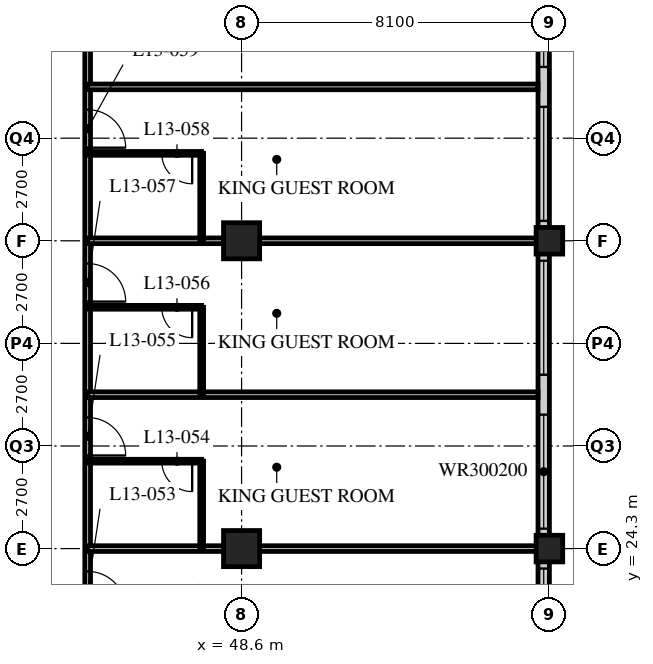
"""IFC4 building model, lengths in metres.
Left out: names, types, materials, properties, quantities, classifications, styles, units other than length and angle.
Written with IfcOpenShell. Run it as: python <this file> out.ifc"""

import sys

from ifc_helpers import new_model, si_unit, direction, frame, frame_2d, origin, origin_2d, place, context, subcontext, project, spatial, rectangle, hollow_rectangle, extrude, element, fill, save


model = new_model("IFC4")
c1 = context("Model", 3, precision=1e-05, world=origin(), true_north=direction((0.0, 1.0)))
c2 = subcontext(c1, "Body", "Model", "MODEL_VIEW")
j1 = project(units=[si_unit("LENGTHUNIT", "METRE"), si_unit("PLANEANGLEUNIT", "RADIAN")], contexts=[c1])
p1 = place(None, origin())
s1 = spatial("IfcSite", under=j1, at=p1, CompositionType="ELEMENT")
p2 = place(p1, origin())
s2 = spatial("IfcBuilding", under=s1, at=p2, CompositionType="ELEMENT")
p3 = place(p2, frame((0.0, 0.0, 56.8)))
s3 = spatial("IfcBuildingStorey", under=s2, at=p3, CompositionType="ELEMENT", Elevation=56.8)
for number, where, z_axis, x_axis in (
    (1, (48.6, 24.3, 0.0), (0.0, 0.0, 1.0), (1.0, 0.0, 0.0)),
    (2, (48.6, 32.4, 0.0), (0.0, 0.0, 1.0), (1.0, 0.0, 0.0)),
):
    element("IfcColumn", number, at=place(p3, frame(where, z_axis=z_axis, x_axis=x_axis)), inside=s3, PredefinedType="COLUMN", context=c2, shape_type="SweptSolid", body=[
        extrude(hollow_rectangle(XDim=0.95, YDim=0.95, WallThickness=0.095, at=origin_2d()), origin(), (0.0, 0.0, 1.0), 3.4),
    ])
for number, where, z_axis, x_axis in (
    (3, (56.7, 24.3, 0.0), (0.0, 0.0, 1.0), (1.0, 0.0, 0.0)),
    (4, (56.7, 32.4, 0.0), (0.0, 0.0, 1.0), (1.0, 0.0, 0.0)),
):
    element("IfcColumn", number, at=place(p3, frame(where, z_axis=z_axis, x_axis=x_axis)), inside=s3, PredefinedType="COLUMN", context=c2, shape_type="SweptSolid", body=[
        extrude(hollow_rectangle(XDim=0.7, YDim=0.7, WallThickness=0.06, at=origin_2d()), origin(), (0.0, 0.0, 1.0), 3.4),
    ])
p4 = place(p3, frame((56.55, 8.4, 0.0), z_axis=(0.0, 0.0, 1.0), x_axis=(0.0, 1.0, 0.0)))
e5 = element("IfcWall", 5, at=p4, inside=s3, PredefinedType="SOLIDWALL", context=c2, shape_type="SweptSolid", body=[
    extrude(rectangle(XDim=32.1, YDim=0.3, at=frame_2d((16.05, 0.0))), origin(), (0.0, 0.0, 1.0), 3.19),
])
p5 = place(p4, frame((0.225, 0.0, 0.9)))
e6 = element("IfcOpeningElement", 6, at=p5, cuts=e5, PredefinedType="OPENING", context=c2, shape_type="SweptSolid", body=[
    extrude(rectangle(XDim=3.0, YDim=2.0, at=frame_2d((1.5, 1.0))), frame((0.0, 0.16, 0.0), z_axis=(0.0, -1.0, 0.0), x_axis=(1.0, 0.0, 0.0)), (0.0, 0.0, 1.0), 0.32),
])
p6 = place(p4, frame((4.275, 0.0, 0.9)))
e7 = element("IfcOpeningElement", 7, at=p6, cuts=e5, PredefinedType="OPENING", context=c2, shape_type="SweptSolid", body=[
    extrude(rectangle(XDim=3.0, YDim=2.0, at=frame_2d((1.5, 1.0))), frame((0.0, 0.16, 0.0), z_axis=(0.0, -1.0, 0.0), x_axis=(1.0, 0.0, 0.0)), (0.0, 0.0, 1.0), 0.32),
])
p7 = place(p4, frame((8.325, 0.0, 0.9)))
e8 = element("IfcOpeningElement", 8, at=p7, cuts=e5, PredefinedType="OPENING", context=c2, shape_type="SweptSolid", body=[
    extrude(rectangle(XDim=3.0, YDim=2.0, at=frame_2d((1.5, 1.0))), frame((0.0, 0.16, 0.0), z_axis=(0.0, -1.0, 0.0), x_axis=(1.0, 0.0, 0.0)), (0.0, 0.0, 1.0), 0.32),
])
p8 = place(p4, frame((12.375, 0.0, 0.9)))
e9 = element("IfcOpeningElement", 9, at=p8, cuts=e5, PredefinedType="OPENING", context=c2, shape_type="SweptSolid", body=[
    extrude(rectangle(XDim=3.0, YDim=2.0, at=frame_2d((1.5, 1.0))), frame((0.0, 0.16, 0.0), z_axis=(0.0, -1.0, 0.0), x_axis=(1.0, 0.0, 0.0)), (0.0, 0.0, 1.0), 0.32),
])
p9 = place(p4, frame((16.425, 0.0, 0.9)))
e10 = element("IfcOpeningElement", 10, at=p9, cuts=e5, PredefinedType="OPENING", context=c2, shape_type="SweptSolid", body=[
    extrude(rectangle(XDim=3.0, YDim=2.0, at=frame_2d((1.5, 1.0))), frame((0.0, 0.16, 0.0), z_axis=(0.0, -1.0, 0.0), x_axis=(1.0, 0.0, 0.0)), (0.0, 0.0, 1.0), 0.32),
])
p10 = place(p4, frame((20.475, 0.0, 0.9)))
e11 = element("IfcOpeningElement", 11, at=p10, cuts=e5, PredefinedType="OPENING", context=c2, shape_type="SweptSolid", body=[
    extrude(rectangle(XDim=3.0, YDim=2.0, at=frame_2d((1.5, 1.0))), frame((0.0, 0.16, 0.0), z_axis=(0.0, -1.0, 0.0), x_axis=(1.0, 0.0, 0.0)), (0.0, 0.0, 1.0), 0.32),
])
p11 = place(p4, frame((24.525, 0.0, 0.9)))
e12 = element("IfcOpeningElement", 12, at=p11, cuts=e5, PredefinedType="OPENING", context=c2, shape_type="SweptSolid", body=[
    extrude(rectangle(XDim=3.0, YDim=2.0, at=frame_2d((1.5, 1.0))), frame((0.0, 0.16, 0.0), z_axis=(0.0, -1.0, 0.0), x_axis=(1.0, 0.0, 0.0)), (0.0, 0.0, 1.0), 0.32),
])
p12 = place(p4, frame((28.575, 0.0, 0.9)))
e13 = element("IfcOpeningElement", 13, at=p12, cuts=e5, PredefinedType="OPENING", context=c2, shape_type="SweptSolid", body=[
    extrude(rectangle(XDim=3.0, YDim=2.0, at=frame_2d((1.5, 1.0))), frame((0.0, 0.16, 0.0), z_axis=(0.0, -1.0, 0.0), x_axis=(1.0, 0.0, 0.0)), (0.0, 0.0, 1.0), 0.32),
])
p13 = place(p3, frame((44.55, 12.15, 0.0), z_axis=(0.0, 0.0, 1.0), x_axis=(0.0, 1.0, 0.0)))
e14 = element("IfcWall", 14, at=p13, inside=s3, PredefinedType="PARTITIONING", context=c2, shape_type="SweptSolid", body=[
    extrude(rectangle(XDim=30.15, YDim=0.15, at=frame_2d((15.075, 0.0))), origin(), (0.0, 0.0, 1.0), 3.19),
])
p14 = place(p13, frame((2.75, 0.0, 0.0)))
e15 = element("IfcOpeningElement", 15, at=p14, cuts=e14, PredefinedType="OPENING", context=c2, shape_type="SweptSolid", body=[
    extrude(rectangle(XDim=1.0, YDim=2.1, at=frame_2d((0.5, 1.05))), frame((0.0, 0.085, 0.0), z_axis=(0.0, -1.0, 0.0), x_axis=(1.0, 0.0, 0.0)), (0.0, 0.0, 1.0), 0.17),
])
p15 = place(p13, frame((6.5, 0.0, 0.0)))
e16 = element("IfcOpeningElement", 16, at=p15, cuts=e14, PredefinedType="OPENING", context=c2, shape_type="SweptSolid", body=[
    extrude(rectangle(XDim=1.0, YDim=2.1, at=frame_2d((0.5, 1.05))), frame((0.0, 0.085, 0.0), z_axis=(0.0, -1.0, 0.0), x_axis=(1.0, 0.0, 0.0)), (0.0, 0.0, 1.0), 0.17),
])
p16 = place(p13, frame((10.55, 0.0, 0.0)))
e17 = element("IfcOpeningElement", 17, at=p16, cuts=e14, PredefinedType="OPENING", context=c2, shape_type="SweptSolid", body=[
    extrude(rectangle(XDim=1.0, YDim=2.1, at=frame_2d((0.5, 1.05))), frame((0.0, 0.085, 0.0), z_axis=(0.0, -1.0, 0.0), x_axis=(1.0, 0.0, 0.0)), (0.0, 0.0, 1.0), 0.17),
])
p17 = place(p13, frame((14.6, 0.0, 0.0)))
e18 = element("IfcOpeningElement", 18, at=p17, cuts=e14, PredefinedType="OPENING", context=c2, shape_type="SweptSolid", body=[
    extrude(rectangle(XDim=1.0, YDim=2.1, at=frame_2d((0.5, 1.05))), frame((0.0, 0.085, 0.0), z_axis=(0.0, -1.0, 0.0), x_axis=(1.0, 0.0, 0.0)), (0.0, 0.0, 1.0), 0.17),
])
p18 = place(p13, frame((18.65, 0.0, 0.0)))
e19 = element("IfcOpeningElement", 19, at=p18, cuts=e14, PredefinedType="OPENING", context=c2, shape_type="SweptSolid", body=[
    extrude(rectangle(XDim=1.0, YDim=2.1, at=frame_2d((0.5, 1.05))), frame((0.0, 0.085, 0.0), z_axis=(0.0, -1.0, 0.0), x_axis=(1.0, 0.0, 0.0)), (0.0, 0.0, 1.0), 0.17),
])
p19 = place(p13, frame((22.7, 0.0, 0.0)))
e20 = element("IfcOpeningElement", 20, at=p19, cuts=e14, PredefinedType="OPENING", context=c2, shape_type="SweptSolid", body=[
    extrude(rectangle(XDim=1.0, YDim=2.1, at=frame_2d((0.5, 1.05))), frame((0.0, 0.085, 0.0), z_axis=(0.0, -1.0, 0.0), x_axis=(1.0, 0.0, 0.0)), (0.0, 0.0, 1.0), 0.17),
])
p20 = place(p13, frame((26.7, 0.0, 0.0)))
e21 = element("IfcOpeningElement", 21, at=p20, cuts=e14, PredefinedType="OPENING", context=c2, shape_type="SweptSolid", body=[
    extrude(rectangle(XDim=1.0, YDim=2.1, at=frame_2d((0.5, 1.05))), frame((0.0, 0.085, 0.0), z_axis=(0.0, -1.0, 0.0), x_axis=(1.0, 0.0, 0.0)), (0.0, 0.0, 1.0), 0.17),
])
p21 = place(p3, frame((44.55, 24.3, 0.0), z_axis=(0.0, 0.0, 1.0), x_axis=(1.0, 0.0, 0.0)))
e22 = element("IfcWall", 22, at=p21, inside=s3, PredefinedType="PARTITIONING", context=c2, shape_type="SweptSolid", body=[
    extrude(rectangle(XDim=11.85, YDim=0.15, at=frame_2d((5.925, 0.0))), origin(), (0.0, 0.0, 1.0), 2.578),
])
p22 = place(p3, frame((47.55, 24.3, 0.0), z_axis=(0.0, 0.0, 1.0), x_axis=(0.0, 1.0, 0.0)))
e23 = element("IfcWall", 23, at=p22, inside=s3, PredefinedType="PARTITIONING", context=c2, shape_type="SweptSolid", body=[
    extrude(rectangle(XDim=2.3, YDim=0.1, at=frame_2d((1.15, 0.0))), origin(), (0.0, 0.0, 1.0), 3.19),
])
p23 = place(p3, frame((44.55, 26.6, 0.0), z_axis=(0.0, 0.0, 1.0), x_axis=(1.0, 0.0, 0.0)))
e24 = element("IfcWall", 24, at=p23, inside=s3, PredefinedType="PARTITIONING", context=c2, shape_type="SweptSolid", body=[
    extrude(rectangle(XDim=3.0, YDim=0.1, at=frame_2d((1.5, 0.0))), origin(), (0.0, 0.0, 1.0), 3.19),
])
p24 = place(p23, frame((1.95, 0.0, 0.0)))
e25 = element("IfcOpeningElement", 25, at=p24, cuts=e24, PredefinedType="OPENING", context=c2, shape_type="SweptSolid", body=[
    extrude(rectangle(XDim=0.8, YDim=2.1, at=frame_2d((0.4, 1.05))), frame((0.0, 0.06, 0.0), z_axis=(0.0, -1.0, 0.0), x_axis=(1.0, 0.0, 0.0)), (0.0, 0.0, 1.0), 0.12),
])
p25 = place(p3, frame((44.55, 28.35, 0.0), z_axis=(0.0, 0.0, 1.0), x_axis=(1.0, 0.0, 0.0)))
e26 = element("IfcWall", 26, at=p25, inside=s3, PredefinedType="PARTITIONING", context=c2, shape_type="SweptSolid", body=[
    extrude(rectangle(XDim=11.85, YDim=0.15, at=frame_2d((5.925, 0.0))), origin(), (0.0, 0.0, 1.0), 3.19),
])
p26 = place(p3, frame((47.55, 28.35, 0.0), z_axis=(0.0, 0.0, 1.0), x_axis=(0.0, 1.0, 0.0)))
e27 = element("IfcWall", 27, at=p26, inside=s3, PredefinedType="PARTITIONING", context=c2, shape_type="SweptSolid", body=[
    extrude(rectangle(XDim=2.3, YDim=0.1, at=frame_2d((1.15, 0.0))), origin(), (0.0, 0.0, 1.0), 3.19),
])
p27 = place(p3, frame((44.55, 30.65, 0.0), z_axis=(0.0, 0.0, 1.0), x_axis=(1.0, 0.0, 0.0)))
e28 = element("IfcWall", 28, at=p27, inside=s3, PredefinedType="PARTITIONING", context=c2, shape_type="SweptSolid", body=[
    extrude(rectangle(XDim=3.0, YDim=0.1, at=frame_2d((1.5, 0.0))), origin(), (0.0, 0.0, 1.0), 3.19),
])
p28 = place(p27, frame((1.95, 0.0, 0.0)))
e29 = element("IfcOpeningElement", 29, at=p28, cuts=e28, PredefinedType="OPENING", context=c2, shape_type="SweptSolid", body=[
    extrude(rectangle(XDim=0.8, YDim=2.1, at=frame_2d((0.4, 1.05))), frame((0.0, 0.06, 0.0), z_axis=(0.0, -1.0, 0.0), x_axis=(1.0, 0.0, 0.0)), (0.0, 0.0, 1.0), 0.12),
])
p29 = place(p3, frame((44.55, 32.4, 0.0), z_axis=(0.0, 0.0, 1.0), x_axis=(1.0, 0.0, 0.0)))
e30 = element("IfcWall", 30, at=p29, inside=s3, PredefinedType="PARTITIONING", context=c2, shape_type="SweptSolid", body=[
    extrude(rectangle(XDim=11.85, YDim=0.15, at=frame_2d((5.925, 0.0))), origin(), (0.0, 0.0, 1.0), 2.578),
])
p30 = place(p3, frame((47.55, 32.4, 0.0), z_axis=(0.0, 0.0, 1.0), x_axis=(0.0, 1.0, 0.0)))
e31 = element("IfcWall", 31, at=p30, inside=s3, PredefinedType="PARTITIONING", context=c2, shape_type="SweptSolid", body=[
    extrude(rectangle(XDim=2.3, YDim=0.1, at=frame_2d((1.15, 0.0))), origin(), (0.0, 0.0, 1.0), 3.19),
])
p31 = place(p3, frame((44.55, 34.7, 0.0), z_axis=(0.0, 0.0, 1.0), x_axis=(1.0, 0.0, 0.0)))
e32 = element("IfcWall", 32, at=p31, inside=s3, PredefinedType="PARTITIONING", context=c2, shape_type="SweptSolid", body=[
    extrude(rectangle(XDim=3.0, YDim=0.1, at=frame_2d((1.5, 0.0))), origin(), (0.0, 0.0, 1.0), 3.19),
])
p32 = place(p31, frame((1.95, 0.0, 0.0)))
e33 = element("IfcOpeningElement", 33, at=p32, cuts=e32, PredefinedType="OPENING", context=c2, shape_type="SweptSolid", body=[
    extrude(rectangle(XDim=0.8, YDim=2.1, at=frame_2d((0.4, 1.05))), frame((0.0, 0.06, 0.0), z_axis=(0.0, -1.0, 0.0), x_axis=(1.0, 0.0, 0.0)), (0.0, 0.0, 1.0), 0.12),
])
p33 = place(p3, frame((44.55, 36.45, 0.0), z_axis=(0.0, 0.0, 1.0), x_axis=(1.0, 0.0, 0.0)))
e34 = element("IfcWall", 34, at=p33, inside=s3, PredefinedType="PARTITIONING", context=c2, shape_type="SweptSolid", body=[
    extrude(rectangle(XDim=11.85, YDim=0.15, at=frame_2d((5.925, 0.0))), origin(), (0.0, 0.0, 1.0), 3.19),
])
p34 = place(p8, origin())
e35 = element("IfcWindow", 35, at=p34, inside=s3, PartitioningType="SINGLE_PANEL", PredefinedType="WINDOW", context=c2, shape_type="SweptSolid", body=[
    extrude(rectangle(XDim=3.0, YDim=2.0, at=frame_2d((1.5, 1.0))), frame((0.0, 0.03, 0.0), z_axis=(0.0, -1.0, 0.0), x_axis=(1.0, 0.0, 0.0)), (0.0, 0.0, 1.0), 0.06),
])
fill(e9, e35)
p35 = place(p9, origin())
e36 = element("IfcWindow", 36, at=p35, inside=s3, PartitioningType="SINGLE_PANEL", PredefinedType="WINDOW", context=c2, shape_type="SweptSolid", body=[
    extrude(rectangle(XDim=3.0, YDim=2.0, at=frame_2d((1.5, 1.0))), frame((0.0, 0.03, 0.0), z_axis=(0.0, -1.0, 0.0), x_axis=(1.0, 0.0, 0.0)), (0.0, 0.0, 1.0), 0.06),
])
fill(e10, e36)
p36 = place(p10, origin())
e37 = element("IfcWindow", 37, at=p36, inside=s3, PartitioningType="SINGLE_PANEL", PredefinedType="WINDOW", context=c2, shape_type="SweptSolid", body=[
    extrude(rectangle(XDim=3.0, YDim=2.0, at=frame_2d((1.5, 1.0))), frame((0.0, 0.03, 0.0), z_axis=(0.0, -1.0, 0.0), x_axis=(1.0, 0.0, 0.0)), (0.0, 0.0, 1.0), 0.06),
])
fill(e11, e37)
p37 = place(p11, origin())
e38 = element("IfcWindow", 38, at=p37, inside=s3, PartitioningType="SINGLE_PANEL", PredefinedType="WINDOW", context=c2, shape_type="SweptSolid", body=[
    extrude(rectangle(XDim=3.0, YDim=2.0, at=frame_2d((1.5, 1.0))), frame((0.0, 0.03, 0.0), z_axis=(0.0, -1.0, 0.0), x_axis=(1.0, 0.0, 0.0)), (0.0, 0.0, 1.0), 0.06),
])
fill(e12, e38)
p38 = place(p12, origin())
e39 = element("IfcWindow", 39, at=p38, inside=s3, PartitioningType="SINGLE_PANEL", PredefinedType="WINDOW", context=c2, shape_type="SweptSolid", body=[
    extrude(rectangle(XDim=3.0, YDim=2.0, at=frame_2d((1.5, 1.0))), frame((0.0, 0.03, 0.0), z_axis=(0.0, -1.0, 0.0), x_axis=(1.0, 0.0, 0.0)), (0.0, 0.0, 1.0), 0.06),
])
fill(e13, e39)
p39 = place(p16, origin())
e40 = element("IfcDoor", 40, at=p39, inside=s3, OperationType="SINGLE_SWING_RIGHT", PredefinedType="DOOR", context=c2, shape_type="SweptSolid", body=[
    extrude(rectangle(XDim=1.0, YDim=2.1, at=frame_2d((0.5, 1.05))), frame((0.0, 0.025, 0.0), z_axis=(0.0, -1.0, 0.0), x_axis=(1.0, 0.0, 0.0)), (0.0, 0.0, 1.0), 0.05),
])
fill(e17, e40)
p40 = place(p24, origin())
e41 = element("IfcDoor", 41, at=p40, inside=s3, OperationType="SINGLE_SWING_LEFT", PredefinedType="DOOR", context=c2, shape_type="SweptSolid", body=[
    extrude(rectangle(XDim=0.8, YDim=2.1, at=frame_2d((0.4, 1.05))), frame((0.0, 0.025, 0.0), z_axis=(0.0, -1.0, 0.0), x_axis=(1.0, 0.0, 0.0)), (0.0, 0.0, 1.0), 0.05),
])
fill(e25, e41)
p41 = place(p17, origin())
e42 = element("IfcDoor", 42, at=p41, inside=s3, OperationType="SINGLE_SWING_RIGHT", PredefinedType="DOOR", context=c2, shape_type="SweptSolid", body=[
    extrude(rectangle(XDim=1.0, YDim=2.1, at=frame_2d((0.5, 1.05))), frame((0.0, 0.025, 0.0), z_axis=(0.0, -1.0, 0.0), x_axis=(1.0, 0.0, 0.0)), (0.0, 0.0, 1.0), 0.05),
])
fill(e18, e42)
p42 = place(p28, origin())
e43 = element("IfcDoor", 43, at=p42, inside=s3, OperationType="SINGLE_SWING_LEFT", PredefinedType="DOOR", context=c2, shape_type="SweptSolid", body=[
    extrude(rectangle(XDim=0.8, YDim=2.1, at=frame_2d((0.4, 1.05))), frame((0.0, 0.025, 0.0), z_axis=(0.0, -1.0, 0.0), x_axis=(1.0, 0.0, 0.0)), (0.0, 0.0, 1.0), 0.05),
])
fill(e29, e43)
p43 = place(p18, origin())
e44 = element("IfcDoor", 44, at=p43, inside=s3, OperationType="SINGLE_SWING_RIGHT", PredefinedType="DOOR", context=c2, shape_type="SweptSolid", body=[
    extrude(rectangle(XDim=1.0, YDim=2.1, at=frame_2d((0.5, 1.05))), frame((0.0, 0.025, 0.0), z_axis=(0.0, -1.0, 0.0), x_axis=(1.0, 0.0, 0.0)), (0.0, 0.0, 1.0), 0.05),
])
fill(e19, e44)
p44 = place(p32, origin())
e45 = element("IfcDoor", 45, at=p44, inside=s3, OperationType="SINGLE_SWING_LEFT", PredefinedType="DOOR", context=c2, shape_type="SweptSolid", body=[
    extrude(rectangle(XDim=0.8, YDim=2.1, at=frame_2d((0.4, 1.05))), frame((0.0, 0.025, 0.0), z_axis=(0.0, -1.0, 0.0), x_axis=(1.0, 0.0, 0.0)), (0.0, 0.0, 1.0), 0.05),
])
fill(e33, e45)
p45 = place(p19, origin())
e46 = element("IfcDoor", 46, at=p45, inside=s3, OperationType="SINGLE_SWING_RIGHT", PredefinedType="DOOR", context=c2, shape_type="SweptSolid", body=[
    extrude(rectangle(XDim=1.0, YDim=2.1, at=frame_2d((0.5, 1.05))), frame((0.0, 0.025, 0.0), z_axis=(0.0, -1.0, 0.0), x_axis=(1.0, 0.0, 0.0)), (0.0, 0.0, 1.0), 0.05),
])
fill(e20, e46)
save(model, sys.argv[1])
